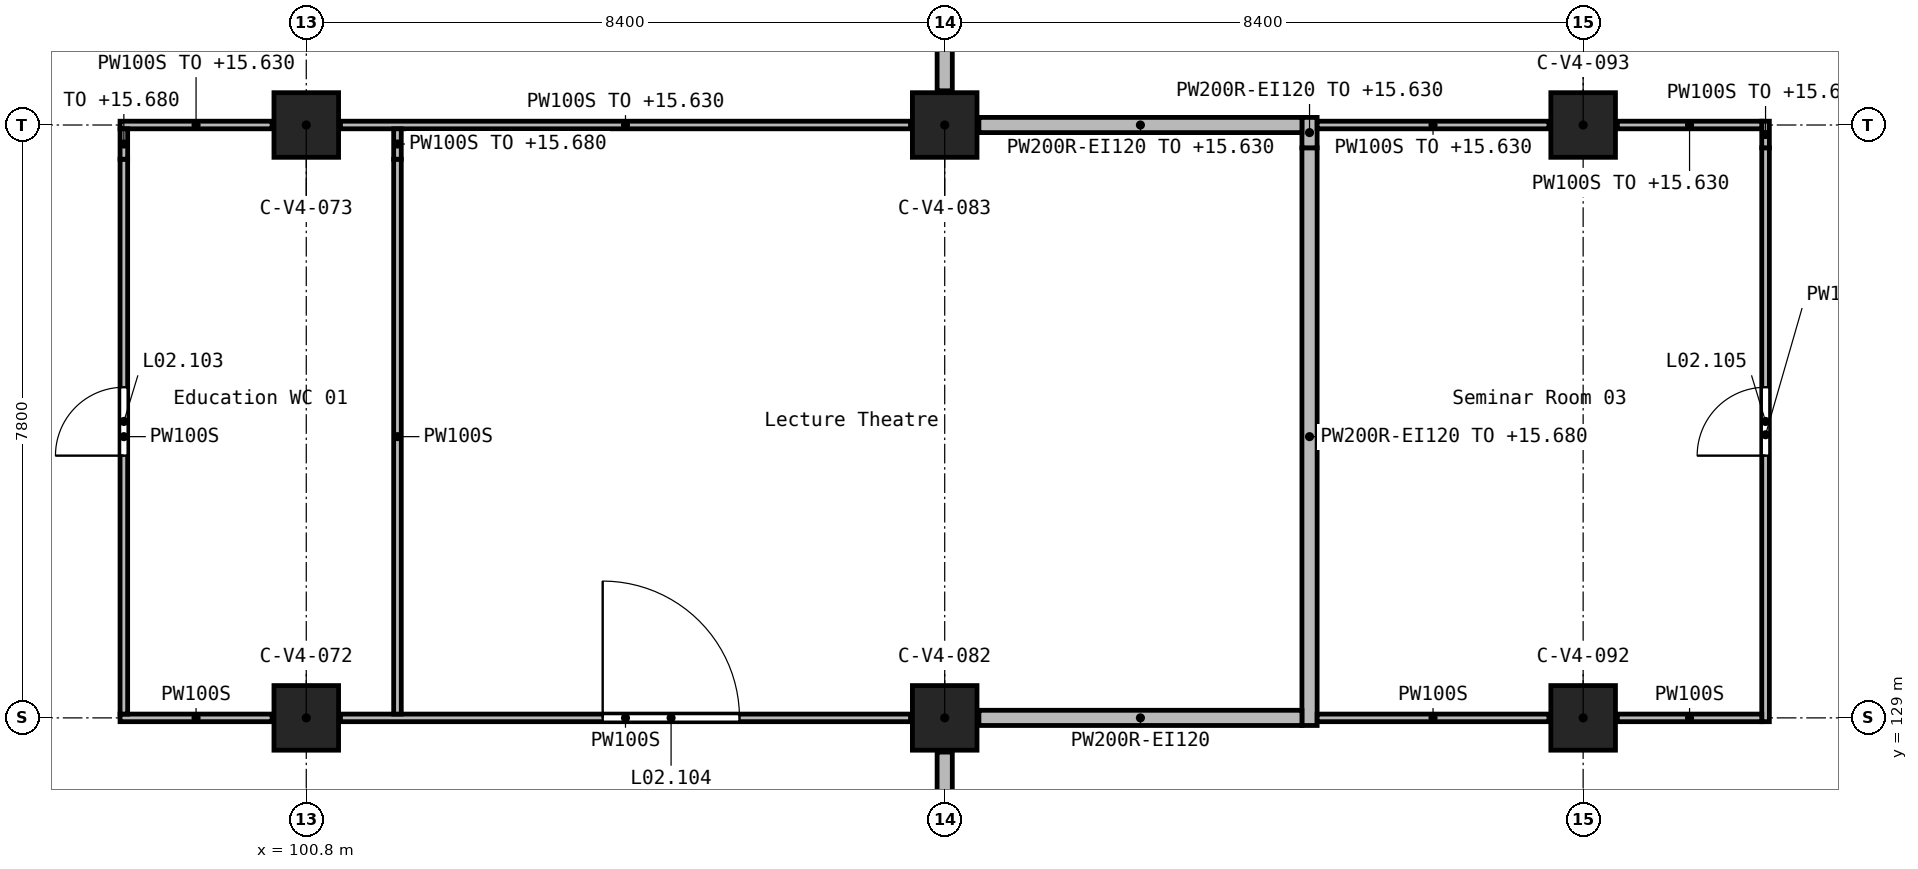
"""IFC4 building model, lengths in metres.
Left out: names, types, materials, properties, quantities, classifications, styles, units other than length and angle.
Written with IfcOpenShell. Run it as: python <this file> out.ifc"""

import sys

from ifc_helpers import new_model, si_unit, direction, frame, frame_2d, origin, origin_2d, place, context, subcontext, project, spatial, rectangle, extrude, element, fill, save


model = new_model("IFC4")
c1 = context("Model", 3, precision=1e-05, world=origin(), true_north=direction((0.0, 1.0)))
c2 = subcontext(c1, "Body", "Model", "MODEL_VIEW")
j1 = project(units=[si_unit("LENGTHUNIT", "METRE"), si_unit("PLANEANGLEUNIT", "RADIAN")], contexts=[c1])
p1 = place(None, origin())
s1 = spatial("IfcSite", under=j1, at=p1, CompositionType="ELEMENT")
p2 = place(p1, origin())
s2 = spatial("IfcBuilding", under=s1, at=p2, CompositionType="ELEMENT")
p3 = place(p2, frame((0.0, 0.0, 12.6)))
s3 = spatial("IfcBuildingStorey", under=s2, at=p3, CompositionType="ELEMENT", Elevation=12.6)
for number, where, z_axis, x_axis in (
    (1, (100.8, 129.0, 0.0), (0.0, 0.0, 1.0), (1.0, 0.0, 0.0)),
    (2, (100.8, 136.8, 0.0), (0.0, 0.0, 1.0), (1.0, 0.0, 0.0)),
    (3, (109.2, 129.0, 0.0), (0.0, 0.0, 1.0), (1.0, 0.0, 0.0)),
    (4, (109.2, 136.8, 0.0), (0.0, 0.0, 1.0), (1.0, 0.0, 0.0)),
    (5, (117.6, 129.0, 0.0), (0.0, 0.0, 1.0), (1.0, 0.0, 0.0)),
    (6, (117.6, 136.8, 0.0), (0.0, 0.0, 1.0), (1.0, 0.0, 0.0)),
):
    element("IfcColumn", number, at=place(p3, frame(where, z_axis=z_axis, x_axis=x_axis)), inside=s3, PredefinedType="COLUMN", context=c2, shape_type="SweptSolid", body=[
        extrude(rectangle(XDim=0.85, YDim=0.85, at=origin_2d()), origin(), (0.0, 0.0, 1.0), 4.2),
    ])
p4 = place(p3, frame((109.2, 139.95, 0.0), z_axis=(0.0, 0.0, 1.0), x_axis=(0.0, -1.0, 0.0)))
e7 = element("IfcWall", 7, at=p4, inside=s3, PredefinedType="SOLIDWALL", context=c2, shape_type="SweptSolid", body=[
    extrude(rectangle(XDim=2.7, YDim=0.2, at=frame_2d((1.35, 0.0))), origin(), (0.0, 0.0, 1.0), 3.85),
])
p5 = place(p3, frame((114.0, 128.9, 0.0), z_axis=(0.0, 0.0, 1.0), x_axis=(0.0, 1.0, 0.0)))
e8 = element("IfcWall", 8, at=p5, inside=s3, PredefinedType="SOLIDWALL", context=c2, shape_type="SweptSolid", body=[
    extrude(rectangle(XDim=7.6, YDim=0.2, at=frame_2d((3.8, 0.0))), origin(), (0.0, 0.0, 1.0), 3.08),
])
p6 = place(p3, frame((114.0, 136.5, 0.0), z_axis=(0.0, 0.0, 1.0), x_axis=(0.0, 1.0, 0.0)))
e9 = element("IfcWall", 9, at=p6, inside=s3, PredefinedType="SOLIDWALL", context=c2, shape_type="SweptSolid", body=[
    extrude(rectangle(XDim=0.4, YDim=0.2, at=frame_2d((0.2, 0.0))), origin(), (0.0, 0.0, 1.0), 3.03),
])
p7 = place(p3, frame((109.65, 129.0, 0.0), z_axis=(0.0, 0.0, 1.0), x_axis=(1.0, 0.0, 0.0)))
e10 = element("IfcWall", 10, at=p7, inside=s3, PredefinedType="SOLIDWALL", context=c2, shape_type="SweptSolid", body=[
    extrude(rectangle(XDim=4.25, YDim=0.2, at=frame_2d((2.125, 0.0))), origin(), (0.0, 0.0, 1.0), 3.85),
])
p8 = place(p3, frame((109.65, 136.8, 0.0), z_axis=(0.0, 0.0, 1.0), x_axis=(1.0, 0.0, 0.0)))
e11 = element("IfcWall", 11, at=p8, inside=s3, PredefinedType="SOLIDWALL", context=c2, shape_type="SweptSolid", body=[
    extrude(rectangle(XDim=4.25, YDim=0.2, at=frame_2d((2.125, 0.0))), origin(), (0.0, 0.0, 1.0), 3.03),
])
p9 = place(p3, frame((109.2, 125.85, 0.0), z_axis=(0.0, 0.0, 1.0), x_axis=(0.0, 1.0, 0.0)))
e12 = element("IfcWall", 12, at=p9, inside=s3, PredefinedType="SOLIDWALL", context=c2, shape_type="SweptSolid", body=[
    extrude(rectangle(XDim=2.7, YDim=0.2, at=frame_2d((1.35, 0.0))), origin(), (0.0, 0.0, 1.0), 3.85),
])
p10 = place(p3, frame((98.35, 129.0, 0.0), z_axis=(0.0, 0.0, 1.0), x_axis=(1.0, 0.0, 0.0)))
e13 = element("IfcWall", 13, at=p10, inside=s3, PredefinedType="PARTITIONING", context=c2, shape_type="SweptSolid", body=[
    extrude(rectangle(XDim=2.0, YDim=0.1, at=frame_2d((1.0, 0.0))), origin(), (0.0, 0.0, 1.0), 3.85),
])
p11 = place(p3, frame((101.25, 129.0, 0.0), z_axis=(0.0, 0.0, 1.0), x_axis=(1.0, 0.0, 0.0)))
e14 = element("IfcWall", 14, at=p11, inside=s3, PredefinedType="PARTITIONING", context=c2, shape_type="SweptSolid", body=[
    extrude(rectangle(XDim=7.5, YDim=0.1, at=frame_2d((3.75, 0.0))), origin(), (0.0, 0.0, 1.0), 3.85),
])
p12 = place(p11, frame((3.45, 0.0, 0.0)))
e15 = element("IfcOpeningElement", 15, at=p12, cuts=e14, PredefinedType="OPENING", context=c2, shape_type="SweptSolid", body=[
    extrude(rectangle(XDim=1.8, YDim=2.1, at=frame_2d((0.9, 1.05))), frame((0.0, 0.06, 0.0), z_axis=(0.0, -1.0, 0.0), x_axis=(1.0, 0.0, 0.0)), (0.0, 0.0, 1.0), 0.12),
])
p13 = place(p3, frame((98.35, 136.8, 0.0), z_axis=(0.0, 0.0, 1.0), x_axis=(1.0, 0.0, 0.0)))
e16 = element("IfcWall", 16, at=p13, inside=s3, PredefinedType="PARTITIONING", context=c2, shape_type="SweptSolid", body=[
    extrude(rectangle(XDim=2.0, YDim=0.1, at=frame_2d((1.0, 0.0))), origin(), (0.0, 0.0, 1.0), 3.03),
])
p14 = place(p3, frame((101.25, 136.8, 0.0), z_axis=(0.0, 0.0, 1.0), x_axis=(1.0, 0.0, 0.0)))
e17 = element("IfcWall", 17, at=p14, inside=s3, PredefinedType="PARTITIONING", context=c2, shape_type="SweptSolid", body=[
    extrude(rectangle(XDim=7.5, YDim=0.1, at=frame_2d((3.75, 0.0))), origin(), (0.0, 0.0, 1.0), 3.03),
])
p15 = place(p3, frame((98.4, 129.05, 0.0), z_axis=(0.0, 0.0, 1.0), x_axis=(0.0, 1.0, 0.0)))
e18 = element("IfcWall", 18, at=p15, inside=s3, PredefinedType="PARTITIONING", context=c2, shape_type="SweptSolid", body=[
    extrude(rectangle(XDim=7.3, YDim=0.1, at=frame_2d((3.65, 0.0))), origin(), (0.0, 0.0, 1.0), 3.85),
])
p16 = place(p15, frame((3.4, 0.0, 0.0)))
e19 = element("IfcOpeningElement", 19, at=p16, cuts=e18, PredefinedType="OPENING", context=c2, shape_type="SweptSolid", body=[
    extrude(rectangle(XDim=0.9, YDim=2.1, at=frame_2d((0.45, 1.05))), frame((0.0, 0.06, 0.0), z_axis=(0.0, -1.0, 0.0), x_axis=(1.0, 0.0, 0.0)), (0.0, 0.0, 1.0), 0.12),
])
p17 = place(p3, frame((98.4, 136.35, 0.0), z_axis=(0.0, 0.0, 1.0), x_axis=(0.0, 1.0, 0.0)))
e20 = element("IfcWall", 20, at=p17, inside=s3, PredefinedType="PARTITIONING", context=c2, shape_type="SweptSolid", body=[
    extrude(rectangle(XDim=0.4, YDim=0.1, at=frame_2d((0.2, 0.0))), origin(), (0.0, 0.0, 1.0), 3.08),
])
p18 = place(p3, frame((102.0, 129.05, 0.0), z_axis=(0.0, 0.0, 1.0), x_axis=(0.0, 1.0, 0.0)))
e21 = element("IfcWall", 21, at=p18, inside=s3, PredefinedType="PARTITIONING", context=c2, shape_type="SweptSolid", body=[
    extrude(rectangle(XDim=7.3, YDim=0.1, at=frame_2d((3.65, 0.0))), origin(), (0.0, 0.0, 1.0), 3.85),
])
p19 = place(p3, frame((102.0, 136.35, 0.0), z_axis=(0.0, 0.0, 1.0), x_axis=(0.0, 1.0, 0.0)))
e22 = element("IfcWall", 22, at=p19, inside=s3, PredefinedType="PARTITIONING", context=c2, shape_type="SweptSolid", body=[
    extrude(rectangle(XDim=0.4, YDim=0.1, at=frame_2d((0.2, 0.0))), origin(), (0.0, 0.0, 1.0), 3.08),
])
p20 = place(p3, frame((120.0, 128.95, 0.0), z_axis=(0.0, 0.0, 1.0), x_axis=(0.0, 1.0, 0.0)))
e23 = element("IfcWall", 23, at=p20, inside=s3, PredefinedType="PARTITIONING", context=c2, shape_type="SweptSolid", body=[
    extrude(rectangle(XDim=7.55, YDim=0.1, at=frame_2d((3.775, 0.0))), origin(), (0.0, 0.0, 1.0), 3.08),
])
p21 = place(p20, frame((3.5, 0.0, 0.0)))
e24 = element("IfcOpeningElement", 24, at=p21, cuts=e23, PredefinedType="OPENING", context=c2, shape_type="SweptSolid", body=[
    extrude(rectangle(XDim=0.9, YDim=2.1, at=frame_2d((0.45, 1.05))), frame((0.0, 0.06, 0.0), z_axis=(0.0, -1.0, 0.0), x_axis=(1.0, 0.0, 0.0)), (0.0, 0.0, 1.0), 0.12),
])
p22 = place(p3, frame((120.0, 136.5, 0.0), z_axis=(0.0, 0.0, 1.0), x_axis=(0.0, 1.0, 0.0)))
e25 = element("IfcWall", 25, at=p22, inside=s3, PredefinedType="PARTITIONING", context=c2, shape_type="SweptSolid", body=[
    extrude(rectangle(XDim=0.35, YDim=0.1, at=frame_2d((0.175, 0.0))), origin(), (0.0, 0.0, 1.0), 3.03),
])
p23 = place(p3, frame((114.1, 129.0, 0.0), z_axis=(0.0, 0.0, 1.0), x_axis=(1.0, 0.0, 0.0)))
e26 = element("IfcWall", 26, at=p23, inside=s3, PredefinedType="PARTITIONING", context=c2, shape_type="SweptSolid", body=[
    extrude(rectangle(XDim=3.05, YDim=0.1, at=frame_2d((1.525, 0.0))), origin(), (0.0, 0.0, 1.0), 3.85),
])
p24 = place(p3, frame((118.05, 129.0, 0.0), z_axis=(0.0, 0.0, 1.0), x_axis=(1.0, 0.0, 0.0)))
e27 = element("IfcWall", 27, at=p24, inside=s3, PredefinedType="PARTITIONING", context=c2, shape_type="SweptSolid", body=[
    extrude(rectangle(XDim=1.9, YDim=0.1, at=frame_2d((0.95, 0.0))), origin(), (0.0, 0.0, 1.0), 3.85),
])
p25 = place(p3, frame((114.1, 136.8, 0.0), z_axis=(0.0, 0.0, 1.0), x_axis=(1.0, 0.0, 0.0)))
e28 = element("IfcWall", 28, at=p25, inside=s3, PredefinedType="PARTITIONING", context=c2, shape_type="SweptSolid", body=[
    extrude(rectangle(XDim=3.05, YDim=0.1, at=frame_2d((1.525, 0.0))), origin(), (0.0, 0.0, 1.0), 3.03),
])
p26 = place(p3, frame((118.05, 136.8, 0.0), z_axis=(0.0, 0.0, 1.0), x_axis=(1.0, 0.0, 0.0)))
e29 = element("IfcWall", 29, at=p26, inside=s3, PredefinedType="PARTITIONING", context=c2, shape_type="SweptSolid", body=[
    extrude(rectangle(XDim=1.9, YDim=0.1, at=frame_2d((0.95, 0.0))), origin(), (0.0, 0.0, 1.0), 3.03),
])
p27 = place(p16, frame((0.9, 0.0, 0.0), z_axis=(0.0, 0.0, 1.0), x_axis=(-1.0, 0.0, 0.0)))
e30 = element("IfcDoor", 30, at=p27, inside=s3, OperationType="SINGLE_SWING_LEFT", PredefinedType="DOOR", context=c2, shape_type="SweptSolid", body=[
    extrude(rectangle(XDim=0.9, YDim=2.1, at=frame_2d((0.45, 1.05))), frame((0.0, 0.025, 0.0), z_axis=(0.0, -1.0, 0.0), x_axis=(1.0, 0.0, 0.0)), (0.0, 0.0, 1.0), 0.05),
])
fill(e19, e30)
p28 = place(p12, origin())
e31 = element("IfcDoor", 31, at=p28, inside=s3, OperationType="DOUBLE_DOOR_SINGLE_SWING", PredefinedType="DOOR", context=c2, shape_type="SweptSolid", body=[
    extrude(rectangle(XDim=1.8, YDim=2.1, at=frame_2d((0.9, 1.05))), frame((0.0, 0.025, 0.0), z_axis=(0.0, -1.0, 0.0), x_axis=(1.0, 0.0, 0.0)), (0.0, 0.0, 1.0), 0.05),
])
fill(e15, e31)
p29 = place(p21, origin())
e32 = element("IfcDoor", 32, at=p29, inside=s3, OperationType="SINGLE_SWING_RIGHT", PredefinedType="DOOR", context=c2, shape_type="SweptSolid", body=[
    extrude(rectangle(XDim=0.9, YDim=2.1, at=frame_2d((0.45, 1.05))), frame((0.0, 0.025, 0.0), z_axis=(0.0, -1.0, 0.0), x_axis=(1.0, 0.0, 0.0)), (0.0, 0.0, 1.0), 0.05),
])
fill(e24, e32)
save(model, sys.argv[1])
